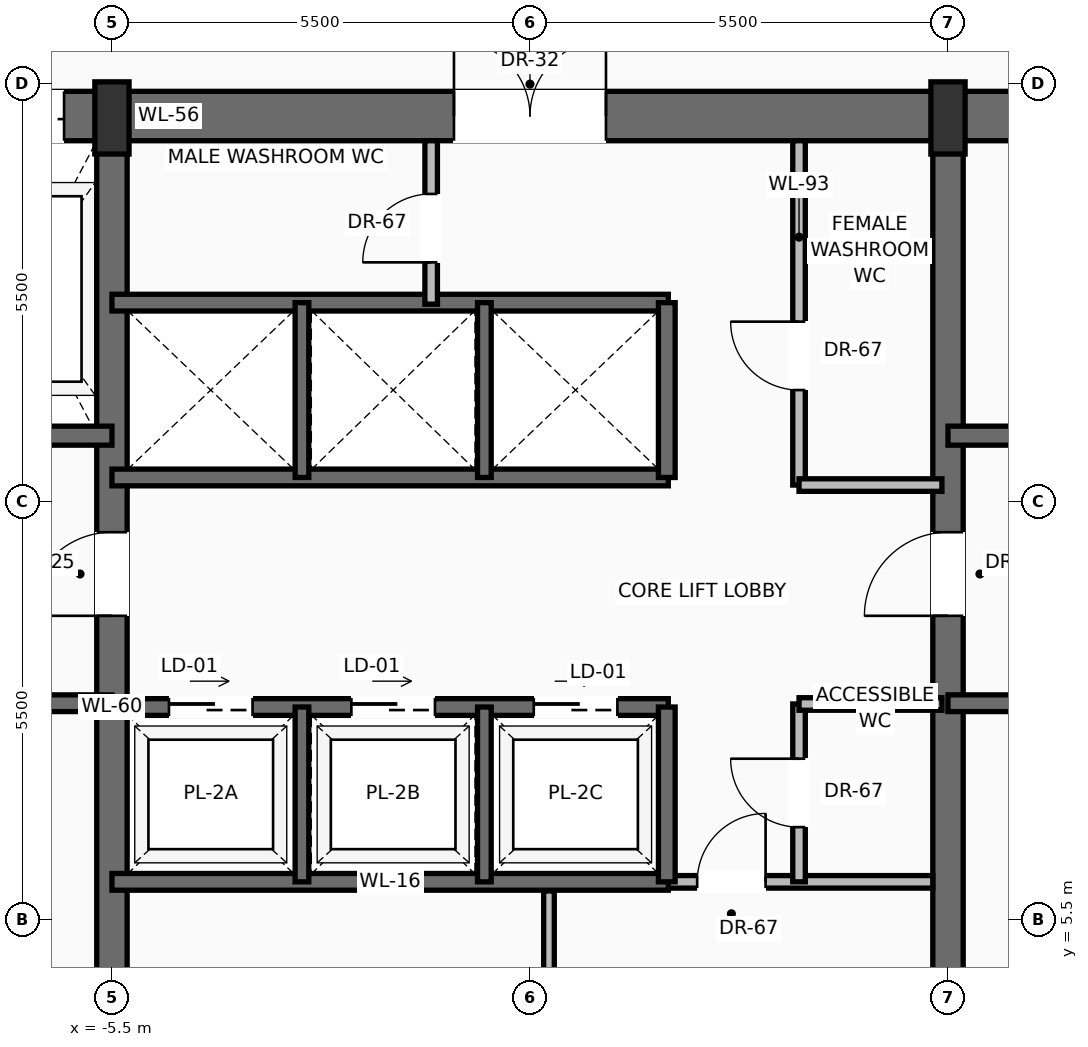
"""IFC4 building model, lengths in metres.
Left out: names, types, materials, properties, quantities, classifications, styles, units other than length and angle.
Written with IfcOpenShell. Run it as: python <this file> out.ifc"""

import sys

from ifc_helpers import new_model, si_unit, direction, frame, frame_2d, origin, origin_2d, place, context, subcontext, project, spatial, rectangle, extrude, source, transform, mapped, element, fill, save


model = new_model("IFC4")
c1 = context("Model", 3, precision=1e-05, world=origin(), true_north=direction((0.0, 1.0)))
c2 = subcontext(c1, "Body", "Model", "MODEL_VIEW")
j1 = project(units=[si_unit("LENGTHUNIT", "METRE"), si_unit("PLANEANGLEUNIT", "RADIAN")], contexts=[c1])
p1 = place(None, origin())
s1 = spatial("IfcSite", under=j1, at=p1, CompositionType="ELEMENT")
p2 = place(p1, origin())
s2 = spatial("IfcBuilding", under=s1, at=p2, CompositionType="ELEMENT")
p3 = place(p2, frame((0.0, 0.0, 155.2)))
s3 = spatial("IfcBuildingStorey", under=s2, at=p3, CompositionType="ELEMENT", Elevation=155.2)
p4 = place(p3, frame((-10.8, 16.075, 0.0), z_axis=(0.0, 0.0, 1.0), x_axis=(1.0, 0.0, 0.0)))
e1 = element("IfcWall", 1, at=p4, inside=s3, PredefinedType="SHEAR", context=c2, shape_type="SweptSolid", body=[
    extrude(rectangle(XDim=21.6, YDim=0.65, at=frame_2d((10.8, 0.0))), origin(), (0.0, 0.0, 1.0), 3.47),
])
p5 = place(p4, frame((3.37, 0.0, 0.0)))
e2 = element("IfcOpeningElement", 2, at=p5, cuts=e1, PredefinedType="OPENING", context=c2, shape_type="SweptSolid", body=[
    extrude(rectangle(XDim=1.3, YDim=2.3, at=frame_2d((0.65, 1.15))), frame((0.0, 0.335, 0.0), z_axis=(0.0, -1.0, 0.0), x_axis=(1.0, 0.0, 0.0)), (0.0, 0.0, 1.0), 0.67),
])
p6 = place(p4, frame((9.8, 0.0, 0.0)))
e3 = element("IfcOpeningElement", 3, at=p6, cuts=e1, PredefinedType="OPENING", context=c2, shape_type="SweptSolid", body=[
    extrude(rectangle(XDim=2.0, YDim=2.4, at=frame_2d((1.0, 1.2))), frame((0.0, 0.335, 0.0), z_axis=(0.0, -1.0, 0.0), x_axis=(1.0, 0.0, 0.0)), (0.0, 0.0, 1.0), 0.67),
])
p7 = place(p3, frame((-5.5, 0.525, 0.0), z_axis=(0.0, 0.0, 1.0), x_axis=(0.0, 1.0, 0.0)))
e4 = element("IfcWall", 4, at=p7, inside=s3, PredefinedType="SHEAR", context=c2, shape_type="SweptSolid", body=[
    extrude(rectangle(XDim=15.55, YDim=0.4, at=frame_2d((7.775, 0.0))), origin(), (0.0, 0.0, 1.0), 3.47),
])
p8 = place(p7, frame((8.975, 0.0, 0.0)))
e5 = element("IfcOpeningElement", 5, at=p8, cuts=e4, PredefinedType="OPENING", context=c2, shape_type="SweptSolid", body=[
    extrude(rectangle(XDim=1.1, YDim=2.2, at=frame_2d((0.55, 1.1))), frame((0.0, 0.21, 0.0), z_axis=(0.0, -1.0, 0.0), x_axis=(1.0, 0.0, 0.0)), (0.0, 0.0, 1.0), 0.42),
])
p9 = place(p3, frame((5.5, 0.525, 0.0), z_axis=(0.0, 0.0, 1.0), x_axis=(0.0, 1.0, 0.0)))
e6 = element("IfcWall", 6, at=p9, inside=s3, PredefinedType="SHEAR", context=c2, shape_type="SweptSolid", body=[
    extrude(rectangle(XDim=15.55, YDim=0.4, at=frame_2d((7.775, 0.0))), origin(), (0.0, 0.0, 1.0), 3.47),
])
p10 = place(p9, frame((8.975, 0.0, 0.0)))
e7 = element("IfcOpeningElement", 7, at=p10, cuts=e6, PredefinedType="OPENING", context=c2, shape_type="SweptSolid", body=[
    extrude(rectangle(XDim=1.1, YDim=2.2, at=frame_2d((0.55, 1.1))), frame((0.0, 0.21, 0.0), z_axis=(0.0, -1.0, 0.0), x_axis=(1.0, 0.0, 0.0)), (0.0, 0.0, 1.0), 0.42),
])
m1 = source(origin(), c2, "Body", "SweptSolid", [
    extrude(rectangle(XDim=0.45, YDim=0.95, at=origin_2d()), origin(), (0.0, 0.0, 1.0), 3.7),
])
for number, where, z_axis, x_axis in (
    (8, (-5.5, 16.05, 0.0), (0.0, 0.0, 1.0), (1.0, 0.0, 0.0)),
    (9, (5.5, 16.05, 0.0), (0.0, 0.0, 1.0), (1.0, 0.0, 0.0)),
):
    element("IfcColumn", number, at=place(p3, frame(where, z_axis=z_axis, x_axis=x_axis)), inside=s3, PredefinedType="PILASTER", context=c2, shape_type="MappedRepresentation", body=[
        mapped(m1, transform((0.0, 0.0, 0.0), scale=1.0)),
    ])
p11 = place(p3, frame((-5.5, 8.35, 0.0), z_axis=(0.0, 0.0, 1.0), x_axis=(-1.0, 0.0, 0.0)))
e10 = element("IfcWall", 10, at=p11, inside=s3, PredefinedType="SOLIDWALL", context=c2, shape_type="SweptSolid", body=[
    extrude(rectangle(XDim=4.65, YDim=0.22, at=frame_2d((2.325, 0.0))), origin(), (0.0, 0.0, 1.0), 3.47),
])
p12 = place(p11, frame((2.5, 0.0, 0.0)))
e11 = element("IfcOpeningElement", 11, at=p12, cuts=e10, PredefinedType="OPENING", context=c2, shape_type="SweptSolid", body=[
    extrude(rectangle(XDim=1.15, YDim=2.2, at=frame_2d((0.575, 1.1))), frame((0.0, 0.12, 0.0), z_axis=(0.0, -1.0, 0.0), x_axis=(1.0, 0.0, 0.0)), (0.0, 0.0, 1.0), 0.24),
])
p13 = place(p3, frame((-5.5, 11.87, 0.0), z_axis=(0.0, 0.0, 1.0), x_axis=(-1.0, 0.0, 0.0)))
e12 = element("IfcWall", 12, at=p13, inside=s3, PredefinedType="SOLIDWALL", context=c2, shape_type="SweptSolid", body=[
    extrude(rectangle(XDim=4.65, YDim=0.25, at=frame_2d((2.325, 0.0))), origin(), (0.0, 0.0, 1.0), 3.47),
])
p14 = place(p13, frame((2.95, 0.0, 0.0)))
e13 = element("IfcOpeningElement", 13, at=p14, cuts=e12, PredefinedType="OPENING", context=c2, shape_type="SweptSolid", body=[
    extrude(rectangle(XDim=1.2, YDim=2.25, at=frame_2d((0.6, 1.125))), frame((0.0, 0.135, 0.0), z_axis=(0.0, -1.0, 0.0), x_axis=(1.0, 0.0, 0.0)), (0.0, 0.0, 1.0), 0.27),
])
p15 = place(p3, frame((10.15, 8.35, 0.0), z_axis=(0.0, 0.0, 1.0), x_axis=(-1.0, 0.0, 0.0)))
e14 = element("IfcWall", 14, at=p15, inside=s3, PredefinedType="SOLIDWALL", context=c2, shape_type="SweptSolid", body=[
    extrude(rectangle(XDim=4.65, YDim=0.22, at=frame_2d((2.325, 0.0))), origin(), (0.0, 0.0, 1.0), 3.47),
])
p16 = place(p15, frame((1.0, 0.0, 0.0)))
e15 = element("IfcOpeningElement", 15, at=p16, cuts=e14, PredefinedType="OPENING", context=c2, shape_type="SweptSolid", body=[
    extrude(rectangle(XDim=1.15, YDim=2.2, at=frame_2d((0.575, 1.1))), frame((0.0, 0.12, 0.0), z_axis=(0.0, -1.0, 0.0), x_axis=(1.0, 0.0, 0.0)), (0.0, 0.0, 1.0), 0.24),
])
p17 = place(p3, frame((10.15, 11.87, 0.0), z_axis=(0.0, 0.0, 1.0), x_axis=(-1.0, 0.0, 0.0)))
e16 = element("IfcWall", 16, at=p17, inside=s3, PredefinedType="SOLIDWALL", context=c2, shape_type="SweptSolid", body=[
    extrude(rectangle(XDim=4.65, YDim=0.25, at=frame_2d((2.325, 0.0))), origin(), (0.0, 0.0, 1.0), 3.47),
])
p18 = place(p17, frame((0.5, 0.0, 0.0)))
e17 = element("IfcOpeningElement", 17, at=p18, cuts=e16, PredefinedType="OPENING", context=c2, shape_type="SweptSolid", body=[
    extrude(rectangle(XDim=1.2, YDim=2.25, at=frame_2d((0.6, 1.125))), frame((0.0, 0.135, 0.0), z_axis=(0.0, -1.0, 0.0), x_axis=(1.0, 0.0, 0.0)), (0.0, 0.0, 1.0), 0.27),
])
p19 = place(p3, frame((1.82, 6.0, 0.0), z_axis=(0.0, 0.0, 1.0), x_axis=(1.0, 0.0, 0.0)))
e18 = element("IfcWall", 18, at=p19, inside=s3, PredefinedType="PARTITIONING", context=c2, shape_type="SweptSolid", body=[
    extrude(rectangle(XDim=3.48, YDim=0.165, at=frame_2d((1.74, 0.0))), origin(), (0.0, 0.0, 1.0), 3.462),
])
p20 = place(p19, frame((0.38, 0.0, 0.0)))
e19 = element("IfcOpeningElement", 19, at=p20, cuts=e18, PredefinedType="OPENING", context=c2, shape_type="SweptSolid", body=[
    extrude(rectangle(XDim=0.9, YDim=2.1, at=frame_2d((0.45, 1.05))), frame((0.0, 0.093, 0.0), z_axis=(0.0, -1.0, 0.0), x_axis=(1.0, 0.0, 0.0)), (0.0, 0.0, 1.0), 0.185),
])
p21 = place(p3, frame((0.25, 0.85, 0.0), z_axis=(0.0, 0.0, 1.0), x_axis=(0.0, 1.0, 0.0)))
e20 = element("IfcWall", 20, at=p21, inside=s3, PredefinedType="PARTITIONING", context=c2, shape_type="SweptSolid", body=[
    extrude(rectangle(XDim=5.03, YDim=0.14, at=frame_2d((2.515, 0.0))), origin(), (0.0, 0.0, 1.0), 3.462),
])
p22 = place(p21, frame((2.1, 0.0, 0.0)))
e21 = element("IfcOpeningElement", 21, at=p22, cuts=e20, PredefinedType="OPENING", context=c2, shape_type="SweptSolid", body=[
    extrude(rectangle(XDim=0.9, YDim=2.1, at=frame_2d((0.45, 1.05))), frame((0.0, 0.08, 0.0), z_axis=(0.0, -1.0, 0.0), x_axis=(1.0, 0.0, 0.0)), (0.0, 0.0, 1.0), 0.16),
])
p23 = place(p3, frame((3.54, 6.0, 0.0), z_axis=(0.0, 0.0, 1.0), x_axis=(0.0, 1.0, 0.0)))
e22 = element("IfcWall", 22, at=p23, inside=s3, PredefinedType="PARTITIONING", context=c2, shape_type="SweptSolid", body=[
    extrude(rectangle(XDim=2.34, YDim=0.165, at=frame_2d((1.17, 0.0))), origin(), (0.0, 0.0, 1.0), 3.462),
])
p24 = place(p23, frame((0.72, 0.0, 0.0)))
e23 = element("IfcOpeningElement", 23, at=p24, cuts=e22, PredefinedType="OPENING", context=c2, shape_type="SweptSolid", body=[
    extrude(rectangle(XDim=0.9, YDim=2.1, at=frame_2d((0.45, 1.05))), frame((0.0, 0.093, 0.0), z_axis=(0.0, -1.0, 0.0), x_axis=(1.0, 0.0, 0.0)), (0.0, 0.0, 1.0), 0.185),
])
p25 = place(p3, frame((3.54, 8.34, 0.0), z_axis=(0.0, 0.0, 1.0), x_axis=(1.0, 0.0, 0.0)))
e24 = element("IfcWall", 24, at=p25, inside=s3, PredefinedType="PARTITIONING", context=c2, shape_type="SweptSolid", body=[
    extrude(rectangle(XDim=1.88, YDim=0.165, at=frame_2d((0.94, 0.0))), origin(), (0.0, 0.0, 1.0), 3.462),
])
p26 = place(p3, frame((-5.5, 6.0, 0.0), z_axis=(0.0, 0.0, 1.0), x_axis=(1.0, 0.0, 0.0)))
e25 = element("IfcWall", 25, at=p26, inside=s3, PredefinedType="SOLIDWALL", context=c2, shape_type="SweptSolid", body=[
    extrude(rectangle(XDim=7.32, YDim=0.22, at=frame_2d((3.66, 0.0))), origin(), (0.0, 0.0, 1.0), 3.47),
])
p27 = place(p3, frame((-5.5, 8.3, 0.0), z_axis=(0.0, 0.0, 1.0), x_axis=(1.0, 0.0, 0.0)))
e26 = element("IfcWall", 26, at=p27, inside=s3, PredefinedType="SOLIDWALL", context=c2, shape_type="SweptSolid", body=[
    extrude(rectangle(XDim=7.32, YDim=0.22, at=frame_2d((3.66, 0.0))), origin(), (0.0, 0.0, 1.0), 3.47),
])
p28 = place(p27, frame((0.75, 0.0, 0.0)))
e27 = element("IfcOpeningElement", 27, at=p28, cuts=e26, PredefinedType="OPENING", context=c2, shape_type="SweptSolid", body=[
    extrude(rectangle(XDim=1.1, YDim=2.2, at=frame_2d((0.55, 1.1))), frame((0.0, 0.12, 0.0), z_axis=(0.0, -1.0, 0.0), x_axis=(1.0, 0.0, 0.0)), (0.0, 0.0, 1.0), 0.24),
])
p29 = place(p27, frame((3.15, 0.0, 0.0)))
e28 = element("IfcOpeningElement", 28, at=p29, cuts=e26, PredefinedType="OPENING", context=c2, shape_type="SweptSolid", body=[
    extrude(rectangle(XDim=1.1, YDim=2.2, at=frame_2d((0.55, 1.1))), frame((0.0, 0.12, 0.0), z_axis=(0.0, -1.0, 0.0), x_axis=(1.0, 0.0, 0.0)), (0.0, 0.0, 1.0), 0.24),
])
p30 = place(p27, frame((5.55, 0.0, 0.0)))
e29 = element("IfcOpeningElement", 29, at=p30, cuts=e26, PredefinedType="OPENING", context=c2, shape_type="SweptSolid", body=[
    extrude(rectangle(XDim=1.1, YDim=2.2, at=frame_2d((0.55, 1.1))), frame((0.0, 0.12, 0.0), z_axis=(0.0, -1.0, 0.0), x_axis=(1.0, 0.0, 0.0)), (0.0, 0.0, 1.0), 0.24),
])
p31 = place(p3, frame((1.8, 6.0, 0.0), z_axis=(0.0, 0.0, 1.0), x_axis=(0.0, 1.0, 0.0)))
e30 = element("IfcWall", 30, at=p31, inside=s3, PredefinedType="SOLIDWALL", context=c2, shape_type="SweptSolid", body=[
    extrude(rectangle(XDim=2.3, YDim=0.22, at=frame_2d((1.15, 0.0))), origin(), (0.0, 0.0, 1.0), 3.47),
])
for number, where, z_axis, x_axis in (
    (31, (-3.0, 6.0, 0.0), (0.0, 0.0, 1.0), (0.0, 1.0, 0.0)),
    (32, (-0.6, 6.0, 0.0), (0.0, 0.0, 1.0), (0.0, 1.0, 0.0)),
):
    element("IfcWall", number, at=place(p3, frame(where, z_axis=z_axis, x_axis=x_axis)), inside=s3, PredefinedType="SOLIDWALL", context=c2, shape_type="SweptSolid", body=[
        extrude(rectangle(XDim=2.3, YDim=0.18, at=frame_2d((1.15, 0.0))), origin(), (0.0, 0.0, 1.0), 3.47),
    ])
for number, where, z_axis, x_axis in (
    (33, (-5.5, 11.32, 0.0), (0.0, 0.0, 1.0), (1.0, 0.0, 0.0)),
    (34, (-5.5, 13.62, 0.0), (0.0, 0.0, 1.0), (1.0, 0.0, 0.0)),
):
    element("IfcWall", number, at=place(p3, frame(where, z_axis=z_axis, x_axis=x_axis)), inside=s3, PredefinedType="SOLIDWALL", context=c2, shape_type="SweptSolid", body=[
        extrude(rectangle(XDim=7.32, YDim=0.22, at=frame_2d((3.66, 0.0))), origin(), (0.0, 0.0, 1.0), 3.47),
    ])
p32 = place(p3, frame((1.8, 11.32, 0.0), z_axis=(0.0, 0.0, 1.0), x_axis=(0.0, 1.0, 0.0)))
e35 = element("IfcWall", 35, at=p32, inside=s3, PredefinedType="SOLIDWALL", context=c2, shape_type="SweptSolid", body=[
    extrude(rectangle(XDim=2.3, YDim=0.22, at=frame_2d((1.15, 0.0))), origin(), (0.0, 0.0, 1.0), 3.47),
])
for number, where, z_axis, x_axis in (
    (36, (-3.0, 11.32, 0.0), (0.0, 0.0, 1.0), (0.0, 1.0, 0.0)),
    (37, (-0.6, 11.32, 0.0), (0.0, 0.0, 1.0), (0.0, 1.0, 0.0)),
):
    element("IfcWall", number, at=place(p3, frame(where, z_axis=z_axis, x_axis=x_axis)), inside=s3, PredefinedType="SOLIDWALL", context=c2, shape_type="SweptSolid", body=[
        extrude(rectangle(XDim=2.3, YDim=0.18, at=frame_2d((1.15, 0.0))), origin(), (0.0, 0.0, 1.0), 3.47),
    ])
p33 = place(p3, frame((-1.3, 13.6, 0.0), z_axis=(0.0, 0.0, 1.0), x_axis=(0.0, 1.0, 0.0)))
e38 = element("IfcWall", 38, at=p33, inside=s3, PredefinedType="PARTITIONING", context=c2, shape_type="SweptSolid", body=[
    extrude(rectangle(XDim=2.15, YDim=0.165, at=frame_2d((1.075, 0.0))), origin(), (0.0, 0.0, 1.0), 3.462),
])
p34 = place(p33, frame((0.55, 0.0, 0.0)))
e39 = element("IfcOpeningElement", 39, at=p34, cuts=e38, PredefinedType="OPENING", context=c2, shape_type="SweptSolid", body=[
    extrude(rectangle(XDim=0.9, YDim=2.1, at=frame_2d((0.45, 1.05))), frame((0.0, 0.093, 0.0), z_axis=(0.0, -1.0, 0.0), x_axis=(1.0, 0.0, 0.0)), (0.0, 0.0, 1.0), 0.185),
])
p35 = place(p3, frame((3.54, 11.22, 0.0), z_axis=(0.0, 0.0, 1.0), x_axis=(0.0, 1.0, 0.0)))
e40 = element("IfcWall", 40, at=p35, inside=s3, PredefinedType="PARTITIONING", context=c2, shape_type="SweptSolid", body=[
    extrude(rectangle(XDim=4.53, YDim=0.165, at=frame_2d((2.265, 0.0))), origin(), (0.0, 0.0, 1.0), 3.462),
])
p36 = place(p35, frame((1.25, 0.0, 0.0)))
e41 = element("IfcOpeningElement", 41, at=p36, cuts=e40, PredefinedType="OPENING", context=c2, shape_type="SweptSolid", body=[
    extrude(rectangle(XDim=0.9, YDim=2.1, at=frame_2d((0.45, 1.05))), frame((0.0, 0.093, 0.0), z_axis=(0.0, -1.0, 0.0), x_axis=(1.0, 0.0, 0.0)), (0.0, 0.0, 1.0), 0.185),
])
p37 = place(p3, frame((3.54, 11.22, 0.0), z_axis=(0.0, 0.0, 1.0), x_axis=(1.0, 0.0, 0.0)))
e42 = element("IfcWall", 42, at=p37, inside=s3, PredefinedType="PARTITIONING", context=c2, shape_type="SweptSolid", body=[
    extrude(rectangle(XDim=1.88, YDim=0.165, at=frame_2d((0.94, 0.0))), origin(), (0.0, 0.0, 1.0), 3.462),
])
m2 = source(origin(), c2, "Body", "SweptSolid", [
    extrude(rectangle(XDim=1.1, YDim=2.2, at=frame_2d((0.55, 1.1))), frame((0.0, 0.025, 0.0), z_axis=(0.0, -1.0, 0.0), x_axis=(1.0, 0.0, 0.0)), (0.0, 0.0, 1.0), 0.05),
])
p38 = place(p8, origin())
e43 = element("IfcDoor", 43, at=p38, inside=s3, OperationType="SINGLE_SWING_LEFT", PredefinedType="DOOR", context=c2, shape_type="MappedRepresentation", body=[
    mapped(m2, transform((0.0, 0.0, 0.0), scale=1.0)),
])
fill(e5, e43)
m3 = source(origin(), c2, "Body", "SweptSolid", [
    extrude(rectangle(XDim=1.3, YDim=2.3, at=frame_2d((0.65, 1.15))), frame((0.0, 0.025, 0.0), z_axis=(0.0, -1.0, 0.0), x_axis=(1.0, 0.0, 0.0)), (0.0, 0.0, 1.0), 0.05),
])
p39 = place(p5, origin())
e44 = element("IfcDoor", 44, at=p39, inside=s3, OperationType="SLIDING_TO_RIGHT", PredefinedType="DOOR", context=c2, shape_type="MappedRepresentation", body=[
    mapped(m3, transform((0.0, 0.0, 0.0), scale=1.0)),
])
fill(e2, e44)
p40 = place(p10, origin())
e45 = element("IfcDoor", 45, at=p40, inside=s3, OperationType="SINGLE_SWING_LEFT", PredefinedType="DOOR", context=c2, shape_type="MappedRepresentation", body=[
    mapped(m2, transform((0.0, 0.0, 0.0), scale=1.0)),
])
fill(e7, e45)
m4 = source(origin(), c2, "Body", "SweptSolid", [
    extrude(rectangle(XDim=2.0, YDim=2.4, at=frame_2d((1.0, 1.2))), frame((0.0, 0.025, 0.0), z_axis=(0.0, -1.0, 0.0), x_axis=(1.0, 0.0, 0.0)), (0.0, 0.0, 1.0), 0.05),
])
p41 = place(p6, origin())
e46 = element("IfcDoor", 46, at=p41, inside=s3, OperationType="DOUBLE_DOOR_SINGLE_SWING", PredefinedType="DOOR", context=c2, shape_type="MappedRepresentation", body=[
    mapped(m4, transform((0.0, 0.0, 0.0), scale=1.0)),
])
fill(e3, e46)
m5 = source(origin(), c2, "Body", "SweptSolid", [
    extrude(rectangle(XDim=0.9, YDim=2.1, at=frame_2d((0.45, 1.05))), frame((0.0, 0.025, 0.0), z_axis=(0.0, -1.0, 0.0), x_axis=(1.0, 0.0, 0.0)), (0.0, 0.0, 1.0), 0.05),
])
p42 = place(p20, origin())
e47 = element("IfcDoor", 47, at=p42, inside=s3, OperationType="SINGLE_SWING_RIGHT", PredefinedType="DOOR", context=c2, shape_type="MappedRepresentation", body=[
    mapped(m5, transform((0.0, 0.0, 0.0), scale=1.0)),
])
fill(e19, e47)
p43 = place(p24, origin())
e48 = element("IfcDoor", 48, at=p43, inside=s3, OperationType="SINGLE_SWING_RIGHT", PredefinedType="DOOR", context=c2, shape_type="MappedRepresentation", body=[
    mapped(m5, transform((0.0, 0.0, 0.0), scale=1.0)),
])
fill(e23, e48)
m6 = source(origin(), c2, "Body", "SweptSolid", [
    extrude(rectangle(XDim=1.1, YDim=2.2, at=frame_2d((0.55, 1.1))), frame((0.0, 0.025, 0.0), z_axis=(0.0, -1.0, 0.0), x_axis=(1.0, 0.0, 0.0)), (0.0, 0.0, 1.0), 0.05),
])
p44 = place(p28, origin())
e49 = element("IfcDoor", 49, at=p44, inside=s3, OperationType="SLIDING_TO_LEFT", PredefinedType="DOOR", context=c2, shape_type="MappedRepresentation", body=[
    mapped(m6, transform((0.0, 0.0, 0.0), scale=1.0)),
])
fill(e27, e49)
p45 = place(p29, origin())
e50 = element("IfcDoor", 50, at=p45, inside=s3, OperationType="SLIDING_TO_LEFT", PredefinedType="DOOR", context=c2, shape_type="MappedRepresentation", body=[
    mapped(m6, transform((0.0, 0.0, 0.0), scale=1.0)),
])
fill(e28, e50)
p46 = place(p30, origin())
e51 = element("IfcDoor", 51, at=p46, inside=s3, OperationType="SLIDING_TO_LEFT", PredefinedType="DOOR", context=c2, shape_type="MappedRepresentation", body=[
    mapped(m6, transform((0.0, 0.0, 0.0), scale=1.0)),
])
fill(e29, e51)
p47 = place(p34, origin())
e52 = element("IfcDoor", 52, at=p47, inside=s3, OperationType="SINGLE_SWING_LEFT", PredefinedType="DOOR", context=c2, shape_type="MappedRepresentation", body=[
    mapped(m5, transform((0.0, 0.0, 0.0), scale=1.0)),
])
fill(e39, e52)
p48 = place(p36, origin())
e53 = element("IfcDoor", 53, at=p48, inside=s3, OperationType="SINGLE_SWING_RIGHT", PredefinedType="DOOR", context=c2, shape_type="MappedRepresentation", body=[
    mapped(m5, transform((0.0, 0.0, 0.0), scale=1.0)),
])
fill(e41, e53)
save(model, sys.argv[1])
